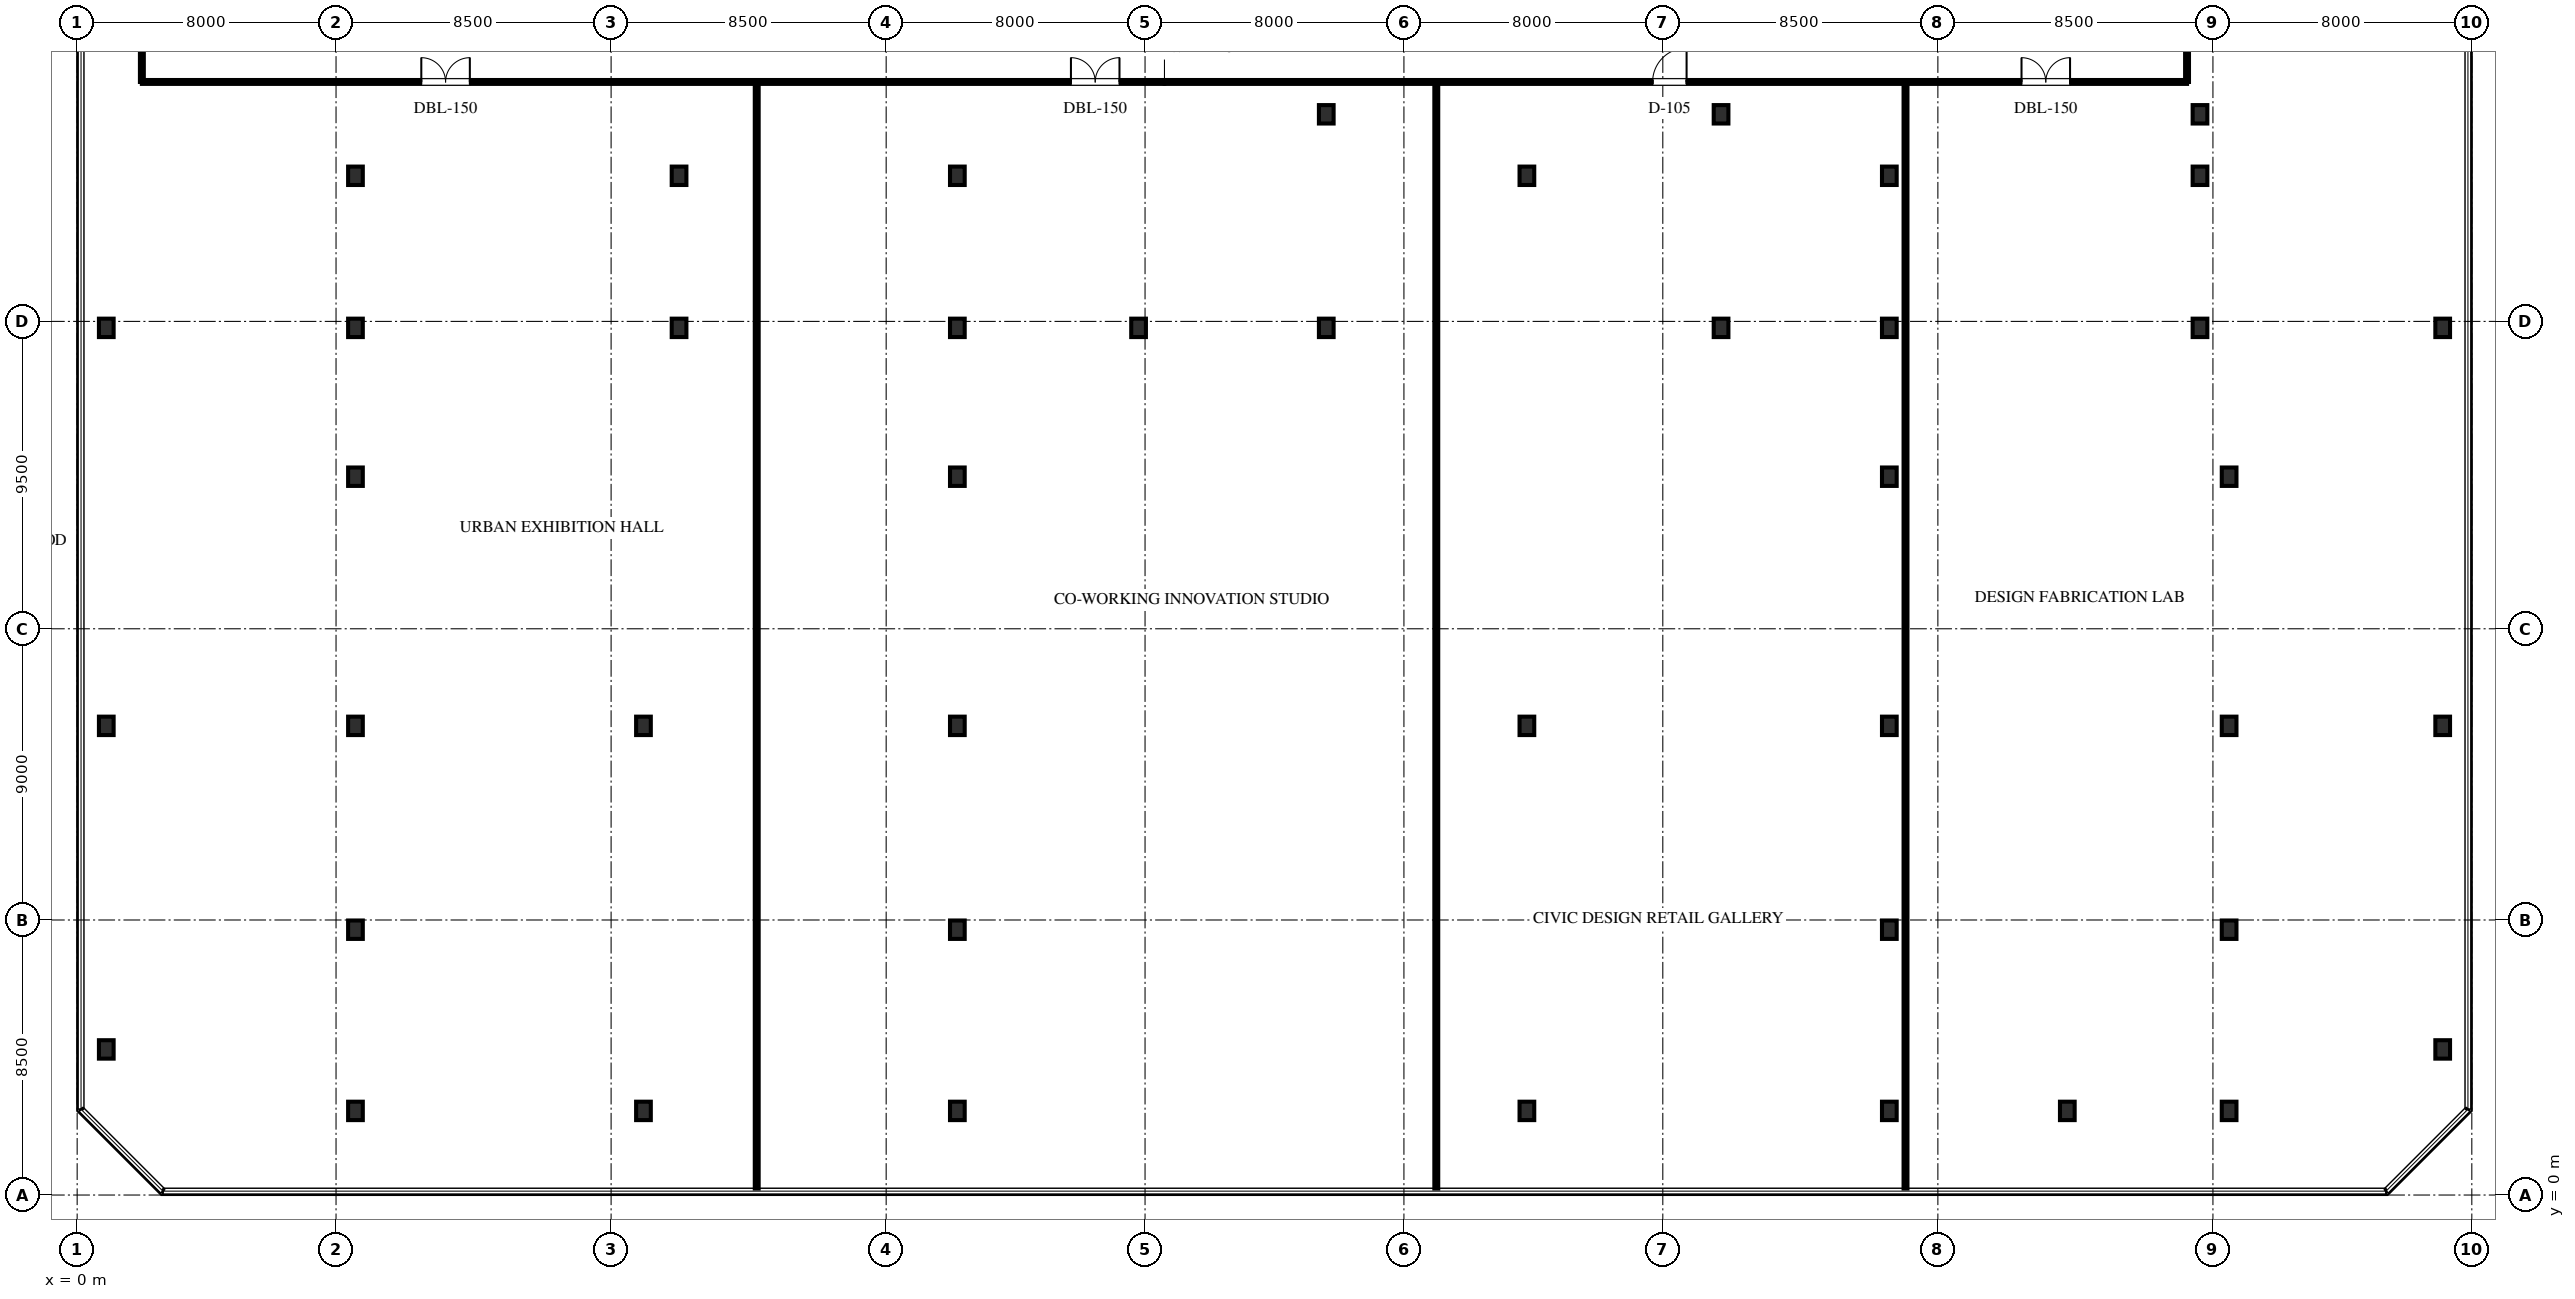
"""IFC4 building model, lengths in metres.
Left out: names, types, materials, properties, quantities, classifications, styles, units other than length and angle.
Written with IfcOpenShell. Run it as: python <this file> out.ifc"""

import sys

from ifc_helpers import new_model, si_unit, direction, frame, frame_2d, origin, origin_2d, place, context, subcontext, project, spatial, rectangle, i_section, extrude, element, fill, save


model = new_model("IFC4")
c1 = context("Model", 3, precision=1e-05, world=origin(), true_north=direction((0.0, 1.0)))
c2 = subcontext(c1, "Body", "Model", "MODEL_VIEW")
j1 = project(units=[si_unit("LENGTHUNIT", "METRE"), si_unit("PLANEANGLEUNIT", "RADIAN")], contexts=[c1])
p1 = place(None, origin())
s1 = spatial("IfcSite", under=j1, at=p1, CompositionType="ELEMENT")
p2 = place(p1, origin())
s2 = spatial("IfcBuilding", under=s1, at=p2, CompositionType="ELEMENT")
p3 = place(p2, frame((0.0, 0.0, 15.3)))
s3 = spatial("IfcBuildingStorey", under=s2, at=p3, CompositionType="ELEMENT", Elevation=15.3)
for number, where, z_axis, x_axis in (
    (1, (8.6, 2.6, 0.0), (0.0, 0.0, 1.0), (1.0, 0.0, 0.0)),
    (2, (17.5, 2.6, 0.0), (0.0, 0.0, 1.0), (1.0, 0.0, 0.0)),
    (3, (27.2, 2.6, 0.0), (0.0, 0.0, 1.0), (1.0, 0.0, 0.0)),
    (4, (44.8, 2.6, 0.0), (0.0, 0.0, 1.0), (1.0, 0.0, 0.0)),
    (5, (56.0, 2.6, 0.0), (0.0, 0.0, 1.0), (1.0, 0.0, 0.0)),
    (6, (61.5, 2.6, 0.0), (0.0, 0.0, 1.0), (1.0, 0.0, 0.0)),
    (7, (66.5, 2.6, 0.0), (0.0, 0.0, 1.0), (1.0, 0.0, 0.0)),
    (8, (8.6, 8.2, 0.0), (0.0, 0.0, 1.0), (1.0, 0.0, 0.0)),
    (9, (27.2, 8.2, 0.0), (0.0, 0.0, 1.0), (1.0, 0.0, 0.0)),
    (10, (56.0, 8.2, 0.0), (0.0, 0.0, 1.0), (1.0, 0.0, 0.0)),
    (11, (66.5, 8.2, 0.0), (0.0, 0.0, 1.0), (1.0, 0.0, 0.0)),
    (12, (8.6, 14.5, 0.0), (0.0, 0.0, 1.0), (1.0, 0.0, 0.0)),
    (13, (17.5, 14.5, 0.0), (0.0, 0.0, 1.0), (1.0, 0.0, 0.0)),
    (14, (27.2, 14.5, 0.0), (0.0, 0.0, 1.0), (1.0, 0.0, 0.0)),
    (15, (44.8, 14.5, 0.0), (0.0, 0.0, 1.0), (1.0, 0.0, 0.0)),
    (16, (56.0, 14.5, 0.0), (0.0, 0.0, 1.0), (1.0, 0.0, 0.0)),
    (17, (66.5, 14.5, 0.0), (0.0, 0.0, 1.0), (1.0, 0.0, 0.0)),
    (18, (8.6, 22.2, 0.0), (0.0, 0.0, 1.0), (1.0, 0.0, 0.0)),
    (19, (27.2, 22.2, 0.0), (0.0, 0.0, 1.0), (1.0, 0.0, 0.0)),
    (20, (56.0, 22.2, 0.0), (0.0, 0.0, 1.0), (1.0, 0.0, 0.0)),
    (21, (66.5, 22.2, 0.0), (0.0, 0.0, 1.0), (1.0, 0.0, 0.0)),
    (22, (8.6, 26.8, 0.0), (0.0, 0.0, 1.0), (1.0, 0.0, 0.0)),
    (23, (18.6, 26.8, 0.0), (0.0, 0.0, 1.0), (1.0, 0.0, 0.0)),
    (24, (27.2, 26.8, 0.0), (0.0, 0.0, 1.0), (1.0, 0.0, 0.0)),
    (25, (32.8, 26.8, 0.0), (0.0, 0.0, 1.0), (1.0, 0.0, 0.0)),
    (26, (38.6, 26.8, 0.0), (0.0, 0.0, 1.0), (1.0, 0.0, 0.0)),
    (27, (50.8, 26.8, 0.0), (0.0, 0.0, 1.0), (1.0, 0.0, 0.0)),
    (28, (56.0, 26.8, 0.0), (0.0, 0.0, 1.0), (1.0, 0.0, 0.0)),
    (29, (65.6, 26.8, 0.0), (0.0, 0.0, 1.0), (1.0, 0.0, 0.0)),
    (30, (8.6, 31.5, 0.0), (0.0, 0.0, 1.0), (1.0, 0.0, 0.0)),
    (31, (18.6, 31.5, 0.0), (0.0, 0.0, 1.0), (1.0, 0.0, 0.0)),
    (32, (27.2, 31.5, 0.0), (0.0, 0.0, 1.0), (1.0, 0.0, 0.0)),
    (33, (44.8, 31.5, 0.0), (0.0, 0.0, 1.0), (1.0, 0.0, 0.0)),
    (34, (56.0, 31.5, 0.0), (0.0, 0.0, 1.0), (1.0, 0.0, 0.0)),
    (35, (65.6, 31.5, 0.0), (0.0, 0.0, 1.0), (1.0, 0.0, 0.0)),
    (36, (0.9, 4.5, 0.0), (0.0, 0.0, 1.0), (1.0, 0.0, 0.0)),
    (37, (0.9, 14.5, 0.0), (0.0, 0.0, 1.0), (1.0, 0.0, 0.0)),
    (38, (0.9, 26.8, 0.0), (0.0, 0.0, 1.0), (1.0, 0.0, 0.0)),
    (39, (73.1, 4.5, 0.0), (0.0, 0.0, 1.0), (1.0, 0.0, 0.0)),
    (40, (73.1, 14.5, 0.0), (0.0, 0.0, 1.0), (1.0, 0.0, 0.0)),
    (41, (73.1, 26.8, 0.0), (0.0, 0.0, 1.0), (1.0, 0.0, 0.0)),
    (42, (38.6, 33.4, 0.0), (0.0, 0.0, 1.0), (1.0, 0.0, 0.0)),
    (43, (50.8, 33.4, 0.0), (0.0, 0.0, 1.0), (1.0, 0.0, 0.0)),
    (44, (65.6, 33.4, 0.0), (0.0, 0.0, 1.0), (1.0, 0.0, 0.0)),
):
    element("IfcColumn", number, at=place(p3, frame(where, z_axis=z_axis, x_axis=x_axis)), inside=s3, PredefinedType="COLUMN", context=c2, shape_type="SweptSolid", body=[
        extrude(i_section(OverallWidth=0.454, OverallDepth=0.569, WebThickness=0.078, FlangeThickness=0.125, FilletRadius=0.03, at=origin_2d()), origin(), (0.0, 0.0, 1.0), 4.5),
    ])
p4 = place(p3, frame((2.0, 34.4, 0.0), z_axis=(0.0, 0.0, 1.0), x_axis=(1.0, 0.0, 0.0)))
e45 = element("IfcWall", 45, at=p4, inside=s3, PredefinedType="PARTITIONING", context=c2, shape_type="SweptSolid", body=[
    extrude(rectangle(XDim=63.2, YDim=0.12, at=frame_2d((31.6, 0.0))), origin(), (0.0, 0.0, 1.0), 3.282),
])
p5 = place(p4, frame((8.635, 0.0, 0.0)))
e46 = element("IfcOpeningElement", 46, at=p5, cuts=e45, PredefinedType="OPENING", context=c2, shape_type="SweptSolid", body=[
    extrude(rectangle(XDim=1.5, YDim=2.2, at=frame_2d((0.75, 1.1))), frame((0.0, 0.07, 0.0), z_axis=(0.0, -1.0, 0.0), x_axis=(1.0, 0.0, 0.0)), (0.0, 0.0, 1.0), 0.14),
])
p6 = place(p4, frame((28.71, 0.0, 0.0)))
e47 = element("IfcOpeningElement", 47, at=p6, cuts=e45, PredefinedType="OPENING", context=c2, shape_type="SweptSolid", body=[
    extrude(rectangle(XDim=1.5, YDim=2.2, at=frame_2d((0.75, 1.1))), frame((0.0, 0.07, 0.0), z_axis=(0.0, -1.0, 0.0), x_axis=(1.0, 0.0, 0.0)), (0.0, 0.0, 1.0), 0.14),
])
p7 = place(p4, frame((46.685, 0.0, 0.0)))
e48 = element("IfcOpeningElement", 48, at=p7, cuts=e45, PredefinedType="OPENING", context=c2, shape_type="SweptSolid", body=[
    extrude(rectangle(XDim=1.05, YDim=2.2, at=frame_2d((0.525, 1.1))), frame((0.0, 0.07, 0.0), z_axis=(0.0, -1.0, 0.0), x_axis=(1.0, 0.0, 0.0)), (0.0, 0.0, 1.0), 0.14),
])
p8 = place(p4, frame((58.085, 0.0, 0.0)))
e49 = element("IfcOpeningElement", 49, at=p8, cuts=e45, PredefinedType="OPENING", context=c2, shape_type="SweptSolid", body=[
    extrude(rectangle(XDim=1.5, YDim=2.2, at=frame_2d((0.75, 1.1))), frame((0.0, 0.07, 0.0), z_axis=(0.0, -1.0, 0.0), x_axis=(1.0, 0.0, 0.0)), (0.0, 0.0, 1.0), 0.14),
])
p9 = place(p3, frame((2.0, 34.4, 0.0), z_axis=(0.0, 0.0, 1.0), x_axis=(0.0, 1.0, 0.0)))
e50 = element("IfcWall", 50, at=p9, inside=s3, PredefinedType="PARTITIONING", context=c2, shape_type="SweptSolid", body=[
    extrude(rectangle(XDim=3.65, YDim=0.12, at=frame_2d((1.825, 0.0))), origin(), (0.0, 0.0, 1.0), 3.282),
])
p10 = place(p3, frame((65.2, 34.4, 0.0), z_axis=(0.0, 0.0, 1.0), x_axis=(0.0, 1.0, 0.0)))
e51 = element("IfcWall", 51, at=p10, inside=s3, PredefinedType="PARTITIONING", context=c2, shape_type="SweptSolid", body=[
    extrude(rectangle(XDim=3.167, YDim=0.12, at=frame_2d((1.583, 0.0))), origin(), (0.0, 0.0, 1.0), 3.282),
])
for number, where, z_axis, x_axis in (
    (52, (21.0, 0.2, 0.0), (0.0, 0.0, 1.0), (0.0, 1.0, 0.0)),
    (53, (42.0, 0.2, 0.0), (0.0, 0.0, 1.0), (0.0, 1.0, 0.0)),
    (54, (56.5, 0.2, 0.0), (0.0, 0.0, 1.0), (0.0, 1.0, 0.0)),
):
    element("IfcWall", number, at=place(p3, frame(where, z_axis=z_axis, x_axis=x_axis)), inside=s3, PredefinedType="PARTITIONING", context=c2, shape_type="SweptSolid", body=[
        extrude(rectangle(XDim=34.132, YDim=0.12, at=frame_2d((17.066, 0.0))), origin(), (0.0, 0.0, 1.0), 3.282),
    ])
p11 = place(p5, origin())
e55 = element("IfcDoor", 55, at=p11, inside=s3, OperationType="DOUBLE_DOOR_SINGLE_SWING", PredefinedType="DOOR", context=c2, shape_type="SweptSolid", body=[
    extrude(rectangle(XDim=1.5, YDim=2.2, at=frame_2d((0.75, 1.1))), frame((0.0, 0.025, 0.0), z_axis=(0.0, -1.0, 0.0), x_axis=(1.0, 0.0, 0.0)), (0.0, 0.0, 1.0), 0.05),
])
fill(e46, e55)
p12 = place(p6, origin())
e56 = element("IfcDoor", 56, at=p12, inside=s3, OperationType="DOUBLE_DOOR_SINGLE_SWING", PredefinedType="DOOR", context=c2, shape_type="SweptSolid", body=[
    extrude(rectangle(XDim=1.5, YDim=2.2, at=frame_2d((0.75, 1.1))), frame((0.0, 0.025, 0.0), z_axis=(0.0, -1.0, 0.0), x_axis=(1.0, 0.0, 0.0)), (0.0, 0.0, 1.0), 0.05),
])
fill(e47, e56)
p13 = place(p7, origin())
e57 = element("IfcDoor", 57, at=p13, inside=s3, OperationType="SINGLE_SWING_RIGHT", PredefinedType="DOOR", context=c2, shape_type="SweptSolid", body=[
    extrude(rectangle(XDim=1.05, YDim=2.2, at=frame_2d((0.525, 1.1))), frame((0.0, 0.025, 0.0), z_axis=(0.0, -1.0, 0.0), x_axis=(1.0, 0.0, 0.0)), (0.0, 0.0, 1.0), 0.05),
])
fill(e48, e57)
p14 = place(p8, origin())
e58 = element("IfcDoor", 58, at=p14, inside=s3, OperationType="DOUBLE_DOOR_SINGLE_SWING", PredefinedType="DOOR", context=c2, shape_type="SweptSolid", body=[
    extrude(rectangle(XDim=1.5, YDim=2.2, at=frame_2d((0.75, 1.1))), frame((0.0, 0.025, 0.0), z_axis=(0.0, -1.0, 0.0), x_axis=(1.0, 0.0, 0.0)), (0.0, 0.0, 1.0), 0.05),
])
fill(e49, e58)
save(model, sys.argv[1])
